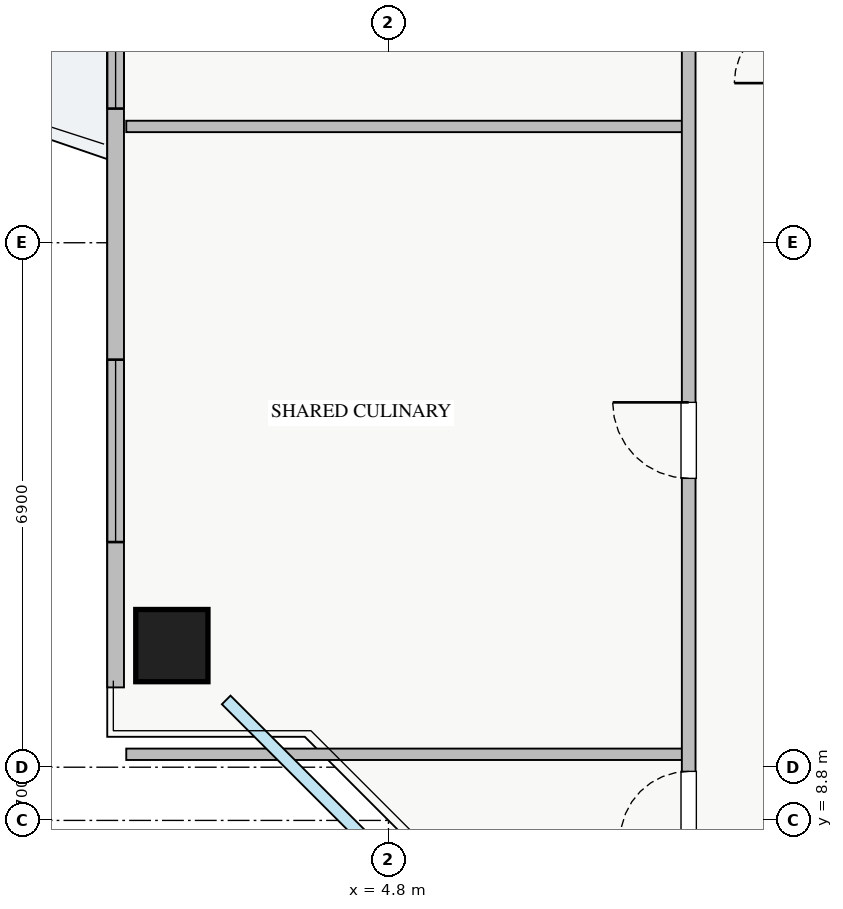
"""IFC4 building model, lengths in metres.
Left out: names, types, materials, properties, quantities, classifications, styles, units other than length and angle.
Written with IfcOpenShell. Run it as: python <this file> out.ifc"""

import sys

from ifc_helpers import new_model, si_unit, direction, frame, frame_2d, origin, origin_2d, place, context, subcontext, project, spatial, rectangle, extrude, source, transform, mapped, element, fill, save


model = new_model("IFC4")
c1 = context("Model", 3, precision=1e-05, world=origin(), true_north=direction((0.0, 1.0)))
c2 = subcontext(c1, "Body", "Model", "MODEL_VIEW")
j1 = project(units=[si_unit("LENGTHUNIT", "METRE"), si_unit("PLANEANGLEUNIT", "RADIAN")], contexts=[c1])
p1 = place(None, origin())
s1 = spatial("IfcSite", under=j1, at=p1, CompositionType="ELEMENT")
p2 = place(p1, origin())
s2 = spatial("IfcBuilding", under=s1, at=p2, CompositionType="ELEMENT")
p3 = place(p2, frame((0.0, 0.0, 147.0)))
s3 = spatial("IfcBuildingStorey", under=s2, at=p3, CompositionType="ELEMENT", Elevation=147.0)
m1 = source(origin(), c2, "Body", "SweptSolid", [
    extrude(rectangle(XDim=0.95, YDim=0.95, at=origin_2d()), origin(), (0.0, 0.0, 1.0), 3.25),
])
p4 = place(p3, frame((1.95, 11.1, 0.0), z_axis=(0.0, 0.0, 1.0), x_axis=(1.0, 0.0, 0.0)))
e1 = element("IfcColumn", 1, at=p4, inside=s3, PredefinedType="COLUMN", context=c2, shape_type="MappedRepresentation", body=[
    mapped(m1, transform((0.0, 0.0, 0.0), x_axis=(1.0, 0.0, 0.0), y_axis=(0.0, 1.0, 0.0), z_axis=(0.0, 0.0, 1.0), scale=1.0)),
])
p5 = place(p3, frame((1.21, 10.55, 0.0), z_axis=(0.0, 0.0, 1.0), x_axis=(0.0, 1.0, 0.0)))
e2 = element("IfcWall", 2, at=p5, inside=s3, PredefinedType="STANDARD", context=c2, shape_type="SweptSolid", body=[
    extrude(rectangle(XDim=24.9, YDim=0.22, at=frame_2d((12.45, 0.0))), origin(), (0.0, 0.0, 1.0), 2.61),
])
p6 = place(p5, frame((13.3, 0.0, 0.0)))
e3 = element("IfcOpeningElement", 3, at=p6, cuts=e2, PredefinedType="OPENING", context=c2, shape_type="SweptSolid", body=[
    extrude(rectangle(XDim=1.2, YDim=2.1, at=frame_2d((0.6, 1.05))), frame((0.0, 0.12, 0.0), z_axis=(0.0, -1.0, 0.0), x_axis=(1.0, 0.0, 0.0)), (0.0, 0.0, 1.0), 0.24),
])
p7 = place(p5, frame((1.912, 0.0, 0.9)))
e4 = element("IfcOpeningElement", 4, at=p7, cuts=e2, PredefinedType="OPENING", context=c2, shape_type="SweptSolid", body=[
    extrude(rectangle(XDim=2.4, YDim=1.48, at=frame_2d((1.2, 0.74))), frame((0.0, 0.12, 0.0), z_axis=(0.0, -1.0, 0.0), x_axis=(1.0, 0.0, 0.0)), (0.0, 0.0, 1.0), 0.24),
])
p8 = place(p5, frame((21.82, 0.0, 0.9)))
e5 = element("IfcOpeningElement", 5, at=p8, cuts=e2, PredefinedType="OPENING", context=c2, shape_type="SweptSolid", body=[
    extrude(rectangle(XDim=2.1, YDim=1.5, at=frame_2d((1.05, 0.75))), frame((0.0, 0.12, 0.0), z_axis=(0.0, -1.0, 0.0), x_axis=(1.0, 0.0, 0.0)), (0.0, 0.0, 1.0), 0.24),
])
p9 = place(p5, frame((12.05, 0.0, 0.9)))
e6 = element("IfcOpeningElement", 6, at=p9, cuts=e2, PredefinedType="OPENING", context=c2, shape_type="SweptSolid", body=[
    extrude(rectangle(XDim=0.9, YDim=1.2, at=frame_2d((0.45, 0.6))), frame((0.0, 0.12, 0.0), z_axis=(0.0, -1.0, 0.0), x_axis=(1.0, 0.0, 0.0)), (0.0, 0.0, 1.0), 0.24),
])
p10 = place(p5, frame((7.615, 0.0, 0.9)))
e7 = element("IfcOpeningElement", 7, at=p10, cuts=e2, PredefinedType="OPENING", context=c2, shape_type="SweptSolid", body=[
    extrude(rectangle(XDim=0.9, YDim=1.2, at=frame_2d((0.45, 0.6))), frame((0.0, 0.12, 0.0), z_axis=(0.0, -1.0, 0.0), x_axis=(1.0, 0.0, 0.0)), (0.0, 0.0, 1.0), 0.24),
])
p11 = place(p5, frame((16.895, 0.0, 0.9)))
e8 = element("IfcOpeningElement", 8, at=p11, cuts=e2, PredefinedType="OPENING", context=c2, shape_type="SweptSolid", body=[
    extrude(rectangle(XDim=0.9, YDim=1.2, at=frame_2d((0.45, 0.6))), frame((0.0, 0.12, 0.0), z_axis=(0.0, -1.0, 0.0), x_axis=(1.0, 0.0, 0.0)), (0.0, 0.0, 1.0), 0.24),
])
for number, where, z_axis, x_axis in (
    (9, (1.35, 9.67, 0.0), (0.0, 0.0, 1.0), (1.0, 0.0, 0.0)),
    (10, (1.35, 17.93, 0.0), (0.0, 0.0, 1.0), (1.0, 0.0, 0.0)),
):
    element("IfcWall", number, at=place(p3, frame(where, z_axis=z_axis, x_axis=x_axis)), inside=s3, PredefinedType="PARTITIONING", context=c2, shape_type="SweptSolid", body=[
        extrude(rectangle(XDim=7.4, YDim=0.15, at=frame_2d((3.7, 0.0))), origin(), (0.0, 0.0, 1.0), 3.07),
    ])
p12 = place(p3, frame((8.75, 8.3, 0.0), z_axis=(0.0, 0.0, 1.0), x_axis=(0.0, 1.0, 0.0)))
e11 = element("IfcWall", 11, at=p12, inside=s3, PredefinedType="PARTITIONING", context=c2, shape_type="SweptSolid", body=[
    extrude(rectangle(XDim=29.4, YDim=0.18, at=frame_2d((14.7, 0.0))), origin(), (0.0, 0.0, 1.0), 3.07),
])
p13 = place(p12, frame((28.08, 0.0, 0.0)))
e12 = element("IfcOpeningElement", 12, at=p13, cuts=e11, PredefinedType="OPENING", context=c2, shape_type="SweptSolid", body=[
    extrude(rectangle(XDim=0.9, YDim=2.05, at=frame_2d((0.45, 1.025))), frame((0.0, 0.1, 0.0), z_axis=(0.0, -1.0, 0.0), x_axis=(1.0, 0.0, 0.0)), (0.0, 0.0, 1.0), 0.2),
])
p14 = place(p12, frame((0.245, 0.0, 0.0)))
e13 = element("IfcOpeningElement", 13, at=p14, cuts=e11, PredefinedType="OPENING", context=c2, shape_type="SweptSolid", body=[
    extrude(rectangle(XDim=0.9, YDim=2.05, at=frame_2d((0.45, 1.025))), frame((0.0, 0.1, 0.0), z_axis=(0.0, -1.0, 0.0), x_axis=(1.0, 0.0, 0.0)), (0.0, 0.0, 1.0), 0.2),
])
p15 = place(p12, frame((5.0, 0.0, 0.0)))
e14 = element("IfcOpeningElement", 14, at=p15, cuts=e11, PredefinedType="OPENING", context=c2, shape_type="SweptSolid", body=[
    extrude(rectangle(XDim=1.0, YDim=2.05, at=frame_2d((0.5, 1.025))), frame((0.0, 0.1, 0.0), z_axis=(0.0, -1.0, 0.0), x_axis=(1.0, 0.0, 0.0)), (0.0, 0.0, 1.0), 0.2),
])
p16 = place(p12, frame((11.165, 0.0, 0.0)))
e15 = element("IfcOpeningElement", 15, at=p16, cuts=e11, PredefinedType="OPENING", context=c2, shape_type="SweptSolid", body=[
    extrude(rectangle(XDim=1.0, YDim=2.05, at=frame_2d((0.5, 1.025))), frame((0.0, 0.1, 0.0), z_axis=(0.0, -1.0, 0.0), x_axis=(1.0, 0.0, 0.0)), (0.0, 0.0, 1.0), 0.2),
])
p17 = place(p12, frame((20.325, 0.0, 0.0)))
e16 = element("IfcOpeningElement", 16, at=p17, cuts=e11, PredefinedType="OPENING", context=c2, shape_type="SweptSolid", body=[
    extrude(rectangle(XDim=1.0, YDim=2.05, at=frame_2d((0.5, 1.025))), frame((0.0, 0.1, 0.0), z_axis=(0.0, -1.0, 0.0), x_axis=(1.0, 0.0, 0.0)), (0.0, 0.0, 1.0), 0.2),
])
m2 = source(origin(), c2, "Body", "SweptSolid", [
    extrude(rectangle(XDim=2.4, YDim=1.48, at=frame_2d((1.2, 0.74))), frame((0.0, 0.03, 0.0), z_axis=(0.0, -1.0, 0.0), x_axis=(1.0, 0.0, 0.0)), (0.0, 0.0, 1.0), 0.06),
])
p18 = place(p7, origin())
e17 = element("IfcWindow", 17, at=p18, inside=s3, PartitioningType="TRIPLE_PANEL_VERTICAL", PredefinedType="WINDOW", context=c2, shape_type="MappedRepresentation", body=[
    mapped(m2, transform((0.0, 0.0, 0.0), x_axis=(1.0, 0.0, 0.0), y_axis=(0.0, 1.0, 0.0), z_axis=(0.0, 0.0, 1.0), scale=1.0)),
])
fill(e4, e17)
m3 = source(origin(), c2, "Body", "SweptSolid", [
    extrude(rectangle(XDim=0.9, YDim=2.05, at=frame_2d((0.45, 1.025))), frame((0.0, 0.025, 0.0), z_axis=(0.0, -1.0, 0.0), x_axis=(1.0, 0.0, 0.0)), (0.0, 0.0, 1.0), 0.05),
])
p19 = place(p14, origin())
e18 = element("IfcDoor", 18, at=p19, inside=s3, OperationType="SINGLE_SWING_LEFT", PredefinedType="DOOR", context=c2, shape_type="MappedRepresentation", body=[
    mapped(m3, transform((0.0, 0.0, 0.0), x_axis=(1.0, 0.0, 0.0), y_axis=(0.0, 1.0, 0.0), z_axis=(0.0, 0.0, 1.0), scale=1.0)),
])
fill(e13, e18)
m4 = source(origin(), c2, "Body", "SweptSolid", [
    extrude(rectangle(XDim=1.0, YDim=2.05, at=frame_2d((0.5, 1.025))), frame((0.0, 0.025, 0.0), z_axis=(0.0, -1.0, 0.0), x_axis=(1.0, 0.0, 0.0)), (0.0, 0.0, 1.0), 0.05),
])
p20 = place(p15, origin())
e19 = element("IfcDoor", 19, at=p20, inside=s3, OperationType="SINGLE_SWING_RIGHT", PredefinedType="DOOR", context=c2, shape_type="MappedRepresentation", body=[
    mapped(m4, transform((0.0, 0.0, 0.0), x_axis=(1.0, 0.0, 0.0), y_axis=(0.0, 1.0, 0.0), z_axis=(0.0, 0.0, 1.0), scale=1.0)),
])
fill(e14, e19)
m5 = source(origin(), c2, "Body", "SweptSolid", [
    extrude(rectangle(XDim=0.9, YDim=1.2, at=frame_2d((0.45, 0.6))), frame((0.0, 0.03, 0.0), z_axis=(0.0, -1.0, 0.0), x_axis=(1.0, 0.0, 0.0)), (0.0, 0.0, 1.0), 0.06),
])
p21 = place(p10, origin())
e20 = element("IfcWindow", 20, at=p21, inside=s3, PartitioningType="SINGLE_PANEL", PredefinedType="WINDOW", context=c2, shape_type="MappedRepresentation", body=[
    mapped(m5, transform((0.0, 0.0, 0.0), x_axis=(1.0, 0.0, 0.0), y_axis=(0.0, 1.0, 0.0), z_axis=(0.0, 0.0, 1.0), scale=1.0)),
])
fill(e7, e20)
save(model, sys.argv[1])
